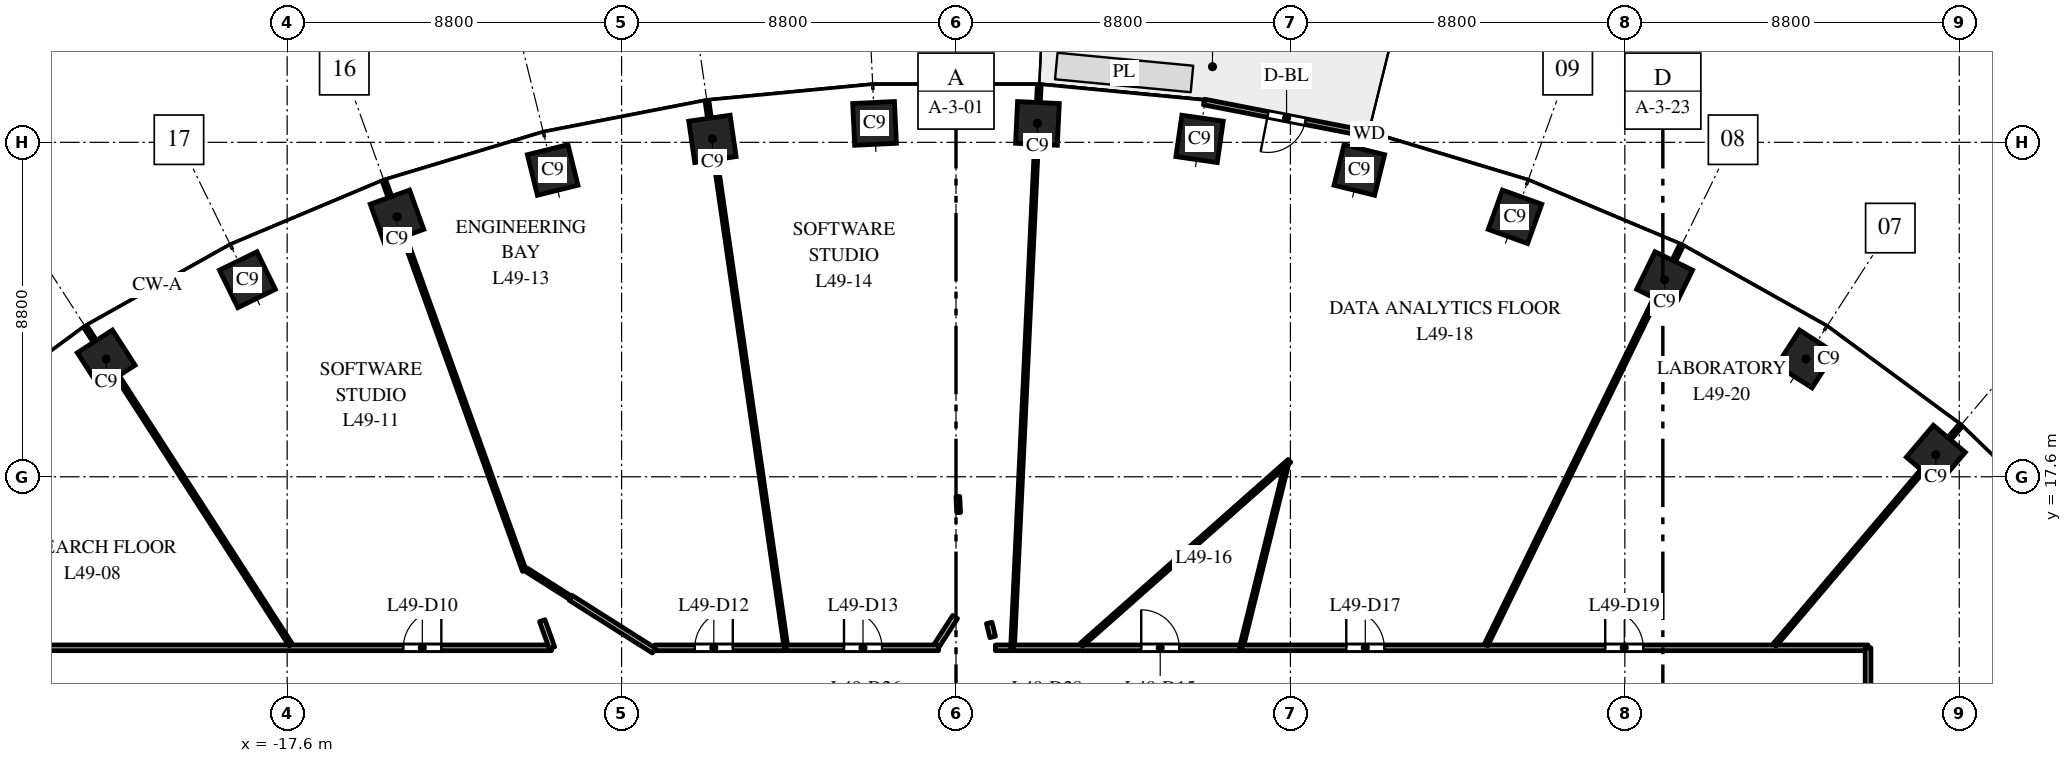
"""IFC4 building model, lengths in metres.
Left out: names, types, materials, properties, quantities, classifications, styles, units other than length and angle.
Written with IfcOpenShell. Run it as: python <this file> out.ifc"""

import sys

from ifc_helpers import new_model, si_unit, direction, frame, frame_2d, origin, origin_2d, place, context, subcontext, project, spatial, rectangle, extrude, element, fill, save


model = new_model("IFC4")
c1 = context("Model", 3, precision=1e-05, world=origin(), true_north=direction((0.0, 1.0)))
c2 = subcontext(c1, "Body", "Model", "MODEL_VIEW")
j1 = project(units=[si_unit("LENGTHUNIT", "METRE"), si_unit("PLANEANGLEUNIT", "RADIAN")], contexts=[c1])
p1 = place(None, origin())
s1 = spatial("IfcSite", under=j1, at=p1, CompositionType="ELEMENT")
p2 = place(p1, origin())
s2 = spatial("IfcBuilding", under=s1, at=p2, CompositionType="ELEMENT")
p3 = place(p2, frame((0.0, 0.0, 237.5)))
s3 = spatial("IfcBuildingStorey", under=s2, at=p3, CompositionType="ELEMENT", Elevation=237.5)
for number, where, z_axis, x_axis in (
    (1, (25.783, 18.18, 0.0), (0.0, 0.0, 1.0), (-0.763, 0.646, 0.0)),
    (2, (22.362, 20.7, 0.0), (0.0, 0.0, 1.0), (-0.84, 0.542, 0.0)),
    (3, (18.646, 22.785, 0.0), (0.0, 0.0, 1.0), (-0.898, 0.439, 0.0)),
    (4, (14.709, 24.441, 0.0), (0.0, 0.0, 1.0), (-0.941, 0.338, 0.0)),
    (5, (10.613, 25.674, 0.0), (0.0, 0.0, 1.0), (-0.971, 0.24, 0.0)),
    (6, (6.409, 26.491, 0.0), (0.0, 0.0, 1.0), (-0.99, 0.143, 0.0)),
    (7, (2.143, 26.898, 0.0), (0.0, 0.0, 1.0), (-0.999, 0.048, 0.0)),
    (8, (-2.143, 26.898, 0.0), (0.0, 0.0, 1.0), (-0.999, -0.048, 0.0)),
    (9, (-6.409, 26.491, 0.0), (0.0, 0.0, 1.0), (-0.99, -0.143, 0.0)),
    (10, (-10.613, 25.674, 0.0), (0.0, 0.0, 1.0), (-0.971, -0.24, 0.0)),
    (11, (-14.709, 24.441, 0.0), (0.0, 0.0, 1.0), (-0.941, -0.338, 0.0)),
    (12, (-18.646, 22.785, 0.0), (0.0, 0.0, 1.0), (-0.898, -0.439, 0.0)),
    (13, (-22.362, 20.7, 0.0), (0.0, 0.0, 1.0), (-0.84, -0.542, 0.0)),
):
    element("IfcColumn", number, at=place(p3, frame(where, z_axis=z_axis, x_axis=x_axis)), inside=s3, PredefinedType="COLUMN", context=c2, shape_type="SweptSolid", body=[
        extrude(rectangle(XDim=1.1, YDim=1.1, at=origin_2d()), origin(), (0.0, 0.0, 1.0), 4.0),
    ])
p4 = place(p3, frame((10.871, 26.617, 0.0), z_axis=(0.0, 0.0, 1.0), x_axis=(-0.981631174778, 0.190788460615, 0.0)))
e14 = element("IfcWall", 14, at=p4, inside=s3, PredefinedType="STANDARD", context=c2, shape_type="SweptSolid", body=[
    extrude(rectangle(XDim=4.426, YDim=0.15, at=frame_2d((2.213, 0.0))), origin(), (0.0, 0.0, 1.0), 3.7),
])
p5 = place(p4, frame((1.713, 0.0, 0.0)))
e15 = element("IfcOpeningElement", 15, at=p5, cuts=e14, PredefinedType="OPENING", context=c2, shape_type="SweptSolid", body=[
    extrude(rectangle(XDim=1.0, YDim=2.4, at=frame_2d((0.5, 1.2))), frame((0.0, 0.085, 0.0), z_axis=(0.0, -1.0, 0.0), x_axis=(1.0, 0.0, 0.0)), (0.0, 0.0, 1.0), 0.17),
])
p6 = place(p3, frame((-24.0, 13.1, 0.0), z_axis=(0.0, 0.0, 1.0), x_axis=(1.0, 0.0, 0.0)))
e16 = element("IfcWall", 16, at=p6, inside=s3, PredefinedType="PARTITIONING", context=c2, shape_type="SweptSolid", body=[
    extrude(rectangle(XDim=13.357, YDim=0.15, at=frame_2d((6.678, 0.0))), origin(), (0.0, 0.0, 1.0), 2.75),
])
p7 = place(p6, frame((9.457, 0.0, 0.0)))
e17 = element("IfcOpeningElement", 17, at=p7, cuts=e16, PredefinedType="OPENING", context=c2, shape_type="SweptSolid", body=[
    extrude(rectangle(XDim=1.0, YDim=2.1, at=frame_2d((0.5, 1.05))), frame((0.0, 0.085, 0.0), z_axis=(0.0, -1.0, 0.0), x_axis=(1.0, 0.0, 0.0)), (0.0, 0.0, 1.0), 0.17),
])
p8 = place(p3, frame((-22.905, 21.542, 0.0), z_axis=(0.0, 0.0, 1.0), x_axis=(0.542277075573, -0.840199722273, 0.0)))
e18 = element("IfcWall", 18, at=p8, inside=s3, PredefinedType="PARTITIONING", context=c2, shape_type="SweptSolid", body=[
    extrude(rectangle(XDim=9.958, YDim=0.1, at=frame_2d((4.979, 0.0))), origin(), (0.0, 0.0, 1.0), 3.0),
])
p9 = place(p3, frame((-15.048, 25.383, 0.0), z_axis=(0.0, 0.0, 1.0), x_axis=(0.338406105684, -0.941000163462, 0.0)))
e19 = element("IfcWall", 19, at=p9, inside=s3, PredefinedType="PARTITIONING", context=c2, shape_type="SweptSolid", body=[
    extrude(rectangle(XDim=10.898, YDim=0.1, at=frame_2d((5.449, 0.0))), origin(), (0.0, 0.0, 1.0), 3.0),
])
p10 = place(p3, frame((-11.319, 15.161, 0.0), z_axis=(0.0, 0.0, 1.0), x_axis=(0.845102975348, -0.534603555037, 0.0)))
e20 = element("IfcWall", 20, at=p10, inside=s3, PredefinedType="PARTITIONING", context=c2, shape_type="SweptSolid", body=[
    extrude(rectangle(XDim=1.399, YDim=0.1, at=frame_2d((0.699, 0.0))), origin(), (0.0, 0.0, 1.0), 3.7),
])
p11 = place(p3, frame((-10.888, 13.814, 0.0), z_axis=(0.0, 0.0, 1.0), x_axis=(0.337396703232, -0.941362557492, 0.0)))
e21 = element("IfcWall", 21, at=p11, inside=s3, PredefinedType="PARTITIONING", context=c2, shape_type="SweptSolid", body=[
    extrude(rectangle(XDim=0.758, YDim=0.15, at=frame_2d((0.379, 0.0))), origin(), (0.0, 0.0, 1.0), 2.85),
])
p12 = place(p3, frame((-10.137, 14.413, 0.0), z_axis=(0.0, 0.0, 1.0), x_axis=(0.844665601723, -0.535294331434, 0.0)))
e22 = element("IfcWall", 22, at=p12, inside=s3, PredefinedType="PARTITIONING", context=c2, shape_type="SweptSolid", body=[
    extrude(rectangle(XDim=2.589, YDim=0.15, at=frame_2d((1.294, 0.0))), origin(), (0.0, 0.0, 1.0), 3.7),
])
p13 = place(p3, frame((-7.925, 13.1, 0.0), z_axis=(0.0, 0.0, 1.0), x_axis=(1.0, 0.0, 0.0)))
e23 = element("IfcWall", 23, at=p13, inside=s3, PredefinedType="PARTITIONING", context=c2, shape_type="SweptSolid", body=[
    extrude(rectangle(XDim=3.432, YDim=0.15, at=frame_2d((1.716, 0.0))), origin(), (0.0, 0.0, 1.0), 2.85),
])
p14 = place(p13, frame((1.052, 0.0, 0.0)))
e24 = element("IfcOpeningElement", 24, at=p14, cuts=e23, PredefinedType="OPENING", context=c2, shape_type="SweptSolid", body=[
    extrude(rectangle(XDim=1.0, YDim=2.1, at=frame_2d((0.5, 1.05))), frame((0.0, 0.085, 0.0), z_axis=(0.0, -1.0, 0.0), x_axis=(1.0, 0.0, 0.0)), (0.0, 0.0, 1.0), 0.17),
])
p15 = place(p3, frame((-6.552, 27.481, 0.0), z_axis=(0.0, 0.0, 1.0), x_axis=(0.143086579044, -0.989710175202, 0.0)))
e25 = element("IfcWall", 25, at=p15, inside=s3, PredefinedType="PARTITIONING", context=c2, shape_type="SweptSolid", body=[
    extrude(rectangle(XDim=14.53, YDim=0.1, at=frame_2d((7.265, 0.0))), origin(), (0.0, 0.0, 1.0), 3.0),
])
p16 = place(p3, frame((-4.473, 13.1, 0.0), z_axis=(0.0, 0.0, 1.0), x_axis=(1.0, 0.0, 0.0)))
e26 = element("IfcWall", 26, at=p16, inside=s3, PredefinedType="PARTITIONING", context=c2, shape_type="SweptSolid", body=[
    extrude(rectangle(XDim=4.015, YDim=0.15, at=frame_2d((2.007, 0.0))), origin(), (0.0, 0.0, 1.0), 2.85),
])
p17 = place(p16, frame((1.526, 0.0, 0.0)))
e27 = element("IfcOpeningElement", 27, at=p17, cuts=e26, PredefinedType="OPENING", context=c2, shape_type="SweptSolid", body=[
    extrude(rectangle(XDim=1.0, YDim=2.1, at=frame_2d((0.5, 1.05))), frame((0.0, 0.085, 0.0), z_axis=(0.0, -1.0, 0.0), x_axis=(1.0, 0.0, 0.0)), (0.0, 0.0, 1.0), 0.17),
])
p18 = place(p3, frame((-0.499, 13.175, 0.0), z_axis=(0.0, 0.0, 1.0), x_axis=(0.542927329512, 0.839779682339, 0.0)))
e28 = element("IfcWall", 28, at=p18, inside=s3, PredefinedType="PARTITIONING", context=c2, shape_type="SweptSolid", body=[
    extrude(rectangle(XDim=0.875, YDim=0.15, at=frame_2d((0.438, 0.0))), origin(), (0.0, 0.0, 1.0), 3.7),
])
p19 = place(p3, frame((0.049, 17.081, 0.0), z_axis=(0.0, 0.0, 1.0), x_axis=(0.047263912187, -0.998882436829, 0.0)))
e29 = element("IfcWall", 29, at=p19, inside=s3, PredefinedType="PARTITIONING", context=c2, shape_type="SweptSolid", body=[
    extrude(rectangle(XDim=0.424, YDim=0.1, at=frame_2d((0.212, 0.0))), origin(), (0.0, 0.0, 1.0), 3.7),
])
p20 = place(p3, frame((0.874, 13.755, 0.0), z_axis=(0.0, 0.0, 1.0), x_axis=(0.239662093978, -0.970856364613, 0.0)))
e30 = element("IfcWall", 30, at=p20, inside=s3, PredefinedType="PARTITIONING", context=c2, shape_type="SweptSolid", body=[
    extrude(rectangle(XDim=0.38, YDim=0.15, at=frame_2d((0.19, 0.0))), origin(), (0.0, 0.0, 1.0), 3.7),
])
p21 = place(p3, frame((1.036, 13.1, 0.0), z_axis=(0.0, 0.0, 1.0), x_axis=(1.0, 0.0, 0.0)))
e31 = element("IfcWall", 31, at=p21, inside=s3, PredefinedType="PARTITIONING", context=c2, shape_type="SweptSolid", body=[
    extrude(rectangle(XDim=0.45, YDim=0.15, at=frame_2d((0.225, 0.0))), origin(), (0.0, 0.0, 1.0), 3.7),
])
p22 = place(p3, frame((1.488, 13.104, 0.0), z_axis=(0.0, 0.0, 1.0), x_axis=(0.047392064639, 0.998876364827, 0.0)))
e32 = element("IfcWall", 32, at=p22, inside=s3, PredefinedType="PARTITIONING", context=c2, shape_type="SweptSolid", body=[
    extrude(rectangle(XDim=14.811, YDim=0.1, at=frame_2d((7.405, 0.0))), origin(), (0.0, 0.0, 1.0), 3.0),
])
p23 = place(p3, frame((1.506, 13.1, 0.0), z_axis=(0.0, 0.0, 1.0), x_axis=(1.0, 0.0, 0.0)))
e33 = element("IfcWall", 33, at=p23, inside=s3, PredefinedType="PARTITIONING", context=c2, shape_type="SweptSolid", body=[
    extrude(rectangle(XDim=6.001, YDim=0.15, at=frame_2d((3.0, 0.0))), origin(), (0.0, 0.0, 1.0), 2.85),
])
p24 = place(p23, frame((3.368, 0.0, 0.0)))
e34 = element("IfcOpeningElement", 34, at=p24, cuts=e33, PredefinedType="OPENING", context=c2, shape_type="SweptSolid", body=[
    extrude(rectangle(XDim=1.0, YDim=2.1, at=frame_2d((0.5, 1.05))), frame((0.0, 0.085, 0.0), z_axis=(0.0, -1.0, 0.0), x_axis=(1.0, 0.0, 0.0)), (0.0, 0.0, 1.0), 0.17),
])
p25 = place(p3, frame((3.3, 13.178, 0.0), z_axis=(0.0, 0.0, 1.0), x_axis=(0.749078819432, 0.662480884462, 0.0)))
e35 = element("IfcWall", 35, at=p25, inside=s3, PredefinedType="PARTITIONING", context=c2, shape_type="SweptSolid", body=[
    extrude(rectangle(XDim=7.307, YDim=0.1, at=frame_2d((3.654, 0.0))), origin(), (0.0, 0.0, 1.0), 3.7),
])
p26 = place(p3, frame((7.507, 13.1, 0.0), z_axis=(0.0, 0.0, 1.0), x_axis=(0.239848980266, 0.970810211455, 0.0)))
e36 = element("IfcWall", 36, at=p26, inside=s3, PredefinedType="PARTITIONING", context=c2, shape_type="SweptSolid", body=[
    extrude(rectangle(XDim=4.919, YDim=0.1, at=frame_2d((2.46, 0.0))), origin(), (0.0, 0.0, 1.0), 3.7),
])
p27 = place(p3, frame((7.524, 13.1, 0.0), z_axis=(0.0, 0.0, 1.0), x_axis=(1.0, 0.0, 0.0)))
e37 = element("IfcWall", 37, at=p27, inside=s3, PredefinedType="PARTITIONING", context=c2, shape_type="SweptSolid", body=[
    extrude(rectangle(XDim=16.476, YDim=0.15, at=frame_2d((8.238, 0.0))), origin(), (0.0, 0.0, 1.0), 2.85),
])
p28 = place(p27, frame((2.746, 0.0, 0.0)))
e38 = element("IfcOpeningElement", 38, at=p28, cuts=e37, PredefinedType="OPENING", context=c2, shape_type="SweptSolid", body=[
    extrude(rectangle(XDim=1.0, YDim=2.1, at=frame_2d((0.5, 1.05))), frame((0.0, 0.085, 0.0), z_axis=(0.0, -1.0, 0.0), x_axis=(1.0, 0.0, 0.0)), (0.0, 0.0, 1.0), 0.17),
])
p29 = place(p27, frame((9.56, 0.0, 0.0)))
e39 = element("IfcOpeningElement", 39, at=p29, cuts=e37, PredefinedType="OPENING", context=c2, shape_type="SweptSolid", body=[
    extrude(rectangle(XDim=1.0, YDim=2.1, at=frame_2d((0.5, 1.05))), frame((0.0, 0.085, 0.0), z_axis=(0.0, -1.0, 0.0), x_axis=(1.0, 0.0, 0.0)), (0.0, 0.0, 1.0), 0.17),
])
p30 = place(p3, frame((13.948, 13.175, 0.0), z_axis=(0.0, 0.0, 1.0), x_axis=(0.439190294188, 0.898394059136, 0.0)))
e40 = element("IfcWall", 40, at=p30, inside=s3, PredefinedType="PARTITIONING", context=c2, shape_type="SweptSolid", body=[
    extrude(rectangle(XDim=11.699, YDim=0.1, at=frame_2d((5.849, 0.0))), origin(), (0.0, 0.0, 1.0), 3.0),
])
p31 = place(p3, frame((21.542, 13.175, 0.0), z_axis=(0.0, 0.0, 1.0), x_axis=(0.646374865928, 0.763020008058, 0.0)))
e41 = element("IfcWall", 41, at=p31, inside=s3, PredefinedType="PARTITIONING", context=c2, shape_type="SweptSolid", body=[
    extrude(rectangle(XDim=7.562, YDim=0.1, at=frame_2d((3.781, 0.0))), origin(), (0.0, 0.0, 1.0), 3.0),
])
p32 = place(p3, frame((24.0, 10.7, 0.0), z_axis=(0.0, 0.0, 1.0), x_axis=(0.0, 1.0, 0.0)))
e42 = element("IfcWall", 42, at=p32, inside=s3, PredefinedType="PARTITIONING", context=c2, shape_type="SweptSolid", body=[
    extrude(rectangle(XDim=2.4, YDim=0.15, at=frame_2d((1.2, 0.0))), origin(), (0.0, 0.0, 1.0), 2.75),
])
p33 = place(p5, origin())
e43 = element("IfcDoor", 43, at=p33, inside=s3, OperationType="SINGLE_SWING_RIGHT", PredefinedType="DOOR", context=c2, shape_type="SweptSolid", body=[
    extrude(rectangle(XDim=1.0, YDim=2.4, at=frame_2d((0.5, 1.2))), frame((0.0, 0.025, 0.0), z_axis=(0.0, -1.0, 0.0), x_axis=(1.0, 0.0, 0.0)), (0.0, 0.0, 1.0), 0.05),
])
fill(e15, e43)
p34 = place(p7, origin())
e44 = element("IfcDoor", 44, at=p34, inside=s3, OperationType="SINGLE_SWING_RIGHT", PredefinedType="DOOR", context=c2, shape_type="SweptSolid", body=[
    extrude(rectangle(XDim=1.0, YDim=2.1, at=frame_2d((0.5, 1.05))), frame((0.0, 0.025, 0.0), z_axis=(0.0, -1.0, 0.0), x_axis=(1.0, 0.0, 0.0)), (0.0, 0.0, 1.0), 0.05),
])
fill(e17, e44)
p35 = place(p14, origin())
e45 = element("IfcDoor", 45, at=p35, inside=s3, OperationType="SINGLE_SWING_RIGHT", PredefinedType="DOOR", context=c2, shape_type="SweptSolid", body=[
    extrude(rectangle(XDim=1.0, YDim=2.1, at=frame_2d((0.5, 1.05))), frame((0.0, 0.025, 0.0), z_axis=(0.0, -1.0, 0.0), x_axis=(1.0, 0.0, 0.0)), (0.0, 0.0, 1.0), 0.05),
])
fill(e24, e45)
p36 = place(p17, origin())
e46 = element("IfcDoor", 46, at=p36, inside=s3, OperationType="SINGLE_SWING_LEFT", PredefinedType="DOOR", context=c2, shape_type="SweptSolid", body=[
    extrude(rectangle(XDim=1.0, YDim=2.1, at=frame_2d((0.5, 1.05))), frame((0.0, 0.025, 0.0), z_axis=(0.0, -1.0, 0.0), x_axis=(1.0, 0.0, 0.0)), (0.0, 0.0, 1.0), 0.05),
])
fill(e27, e46)
p37 = place(p24, origin())
e47 = element("IfcDoor", 47, at=p37, inside=s3, OperationType="SINGLE_SWING_LEFT", PredefinedType="DOOR", context=c2, shape_type="SweptSolid", body=[
    extrude(rectangle(XDim=1.0, YDim=2.1, at=frame_2d((0.5, 1.05))), frame((0.0, 0.025, 0.0), z_axis=(0.0, -1.0, 0.0), x_axis=(1.0, 0.0, 0.0)), (0.0, 0.0, 1.0), 0.05),
])
fill(e34, e47)
p38 = place(p28, origin())
e48 = element("IfcDoor", 48, at=p38, inside=s3, OperationType="SINGLE_SWING_LEFT", PredefinedType="DOOR", context=c2, shape_type="SweptSolid", body=[
    extrude(rectangle(XDim=1.0, YDim=2.1, at=frame_2d((0.5, 1.05))), frame((0.0, 0.025, 0.0), z_axis=(0.0, -1.0, 0.0), x_axis=(1.0, 0.0, 0.0)), (0.0, 0.0, 1.0), 0.05),
])
fill(e38, e48)
p39 = place(p29, origin())
e49 = element("IfcDoor", 49, at=p39, inside=s3, OperationType="SINGLE_SWING_LEFT", PredefinedType="DOOR", context=c2, shape_type="SweptSolid", body=[
    extrude(rectangle(XDim=1.0, YDim=2.1, at=frame_2d((0.5, 1.05))), frame((0.0, 0.025, 0.0), z_axis=(0.0, -1.0, 0.0), x_axis=(1.0, 0.0, 0.0)), (0.0, 0.0, 1.0), 0.05),
])
fill(e39, e49)
save(model, sys.argv[1])
